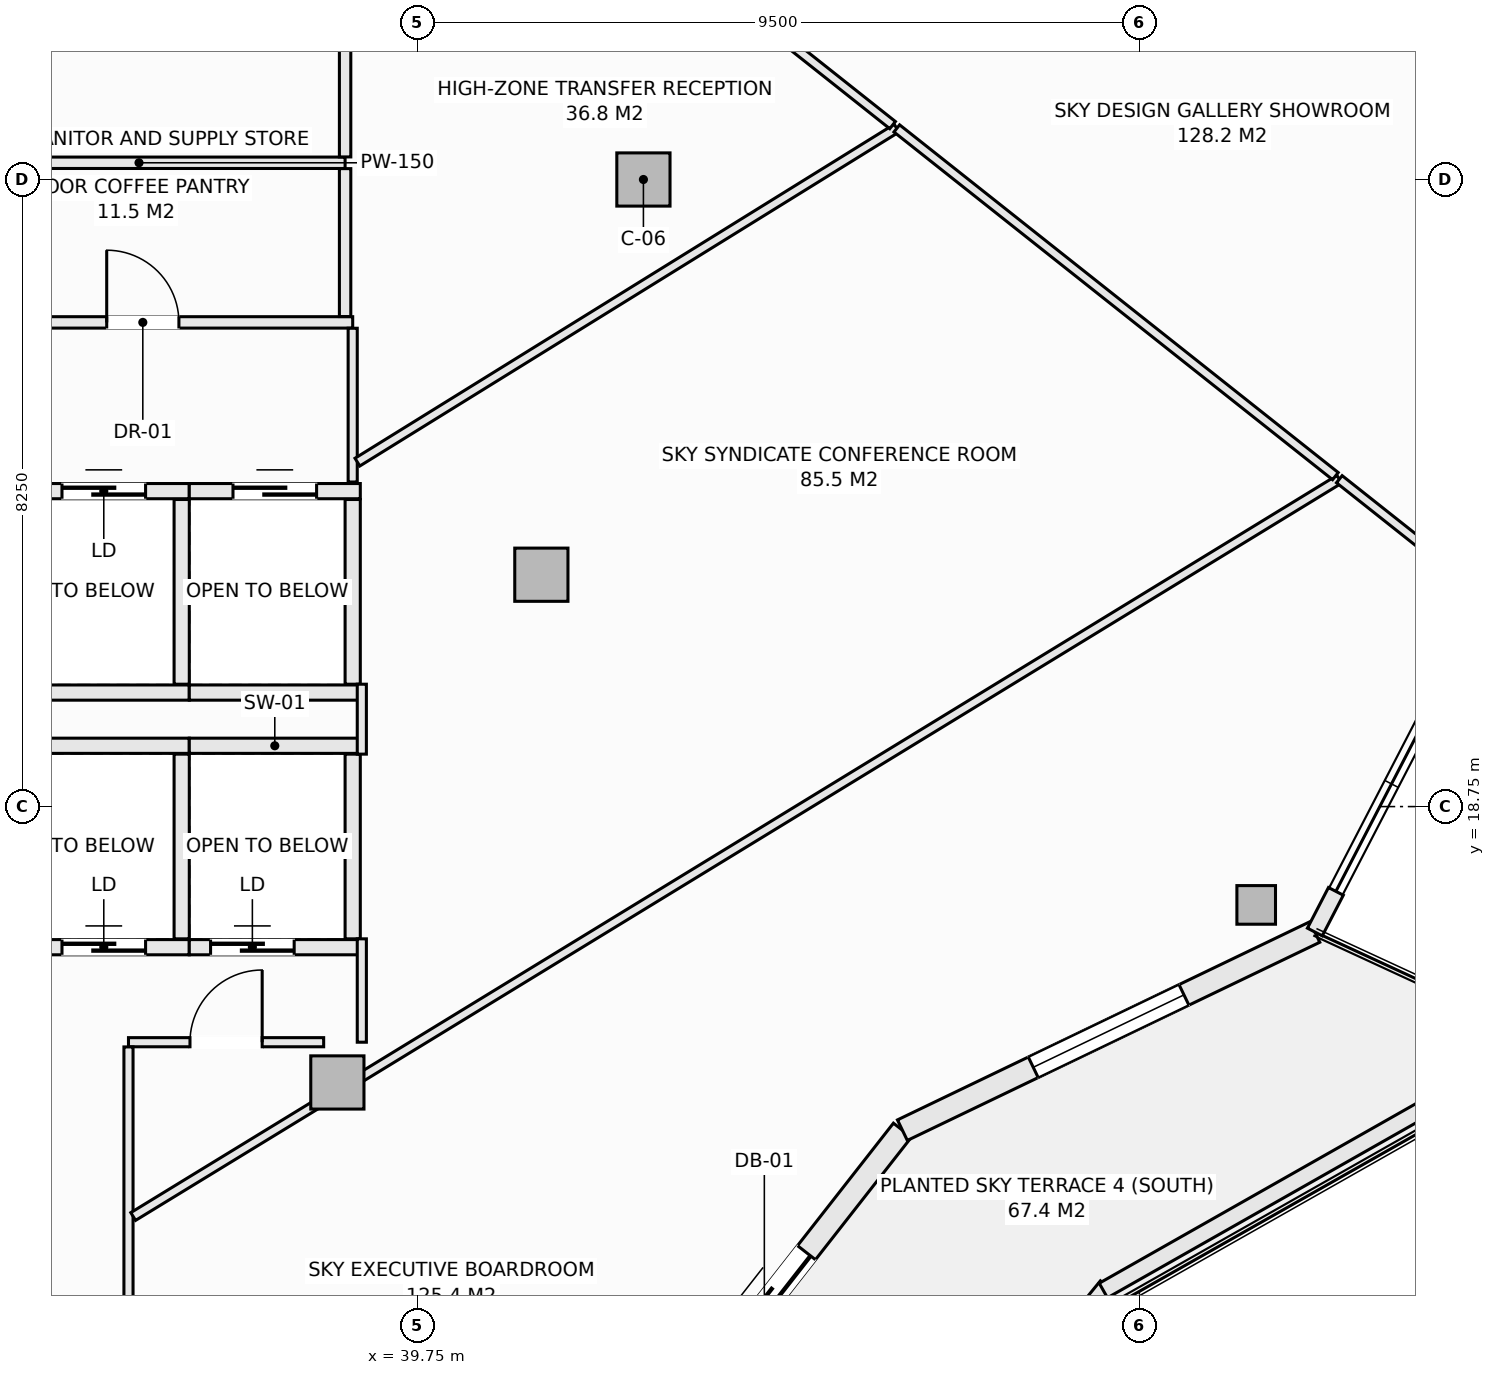
"""IFC4 building model, lengths in metres.
Left out: names, types, materials, properties, quantities, classifications, styles, units other than length and angle.
Written with IfcOpenShell. Run it as: python <this file> out.ifc"""

import sys

from ifc_helpers import new_model, si_unit, direction, frame, frame_2d, origin, origin_2d, place, context, subcontext, project, spatial, rectangle, hollow_rectangle, extrude, element, fill, save


model = new_model("IFC4")
c1 = context("Model", 3, precision=1e-05, world=origin(), true_north=direction((0.0, 1.0)))
c2 = subcontext(c1, "Body", "Model", "MODEL_VIEW")
j1 = project(units=[si_unit("LENGTHUNIT", "METRE"), si_unit("PLANEANGLEUNIT", "RADIAN")], contexts=[c1])
p1 = place(None, origin())
s1 = spatial("IfcSite", under=j1, at=p1, CompositionType="ELEMENT")
p2 = place(p1, origin())
s2 = spatial("IfcBuilding", under=s1, at=p2, CompositionType="ELEMENT")
p3 = place(p2, frame((0.0, 0.0, 191.9)))
s3 = spatial("IfcBuildingStorey", under=s2, at=p3, CompositionType="ELEMENT", Elevation=191.9)
p4 = place(p3, frame((50.787, 17.456, -0.28), z_axis=(0.0, 0.0, 1.0), x_axis=(1.0, 0.0, 0.0)))
e1 = element("IfcColumn", 1, at=p4, inside=s3, PredefinedType="COLUMN", context=c2, shape_type="SweptSolid", body=[
    extrude(hollow_rectangle(XDim=0.508, YDim=0.508, WallThickness=0.019, at=origin_2d()), origin(), (0.0, 0.0, 1.0), 4.51),
])
for number, where, z_axis, x_axis in (
    (2, (42.725, 27.0, -0.28), (0.0, 0.0, 1.0), (1.0, 0.0, 0.0)),
    (3, (38.698, 15.121, -0.28), (0.0, 0.0, 1.0), (1.0, 0.0, 0.0)),
    (4, (41.382, 21.801, -0.28), (0.0, 0.0, 1.0), (1.0, 0.0, 0.0)),
):
    element("IfcColumn", number, at=place(p3, frame(where, z_axis=z_axis, x_axis=x_axis)), inside=s3, PredefinedType="COLUMN", context=c2, shape_type="SweptSolid", body=[
        extrude(rectangle(XDim=0.7, YDim=0.7, at=origin_2d()), origin(), (0.0, 0.0, 1.0), 4.51),
    ])
p5 = place(p3, frame((42.5, 9.853, 0.0), z_axis=(0.0, 0.0, 1.0), x_axis=(0.616450126935, 0.787393955401, 0.0)))
e5 = element("IfcWall", 5, at=p5, inside=s3, PredefinedType="SOLIDWALL", context=c2, shape_type="SweptSolid", body=[
    extrude(rectangle(XDim=5.893, YDim=0.3, at=frame_2d((2.946, 0.0))), origin(), (0.0, 0.0, 1.0), 3.805),
])
p6 = place(p5, frame((2.046, 0.0, 0.0)))
e6 = element("IfcOpeningElement", 6, at=p6, cuts=e5, PredefinedType="OPENING", context=c2, shape_type="SweptSolid", body=[
    extrude(rectangle(XDim=1.8, YDim=2.25, at=frame_2d((0.9, 1.125))), frame((0.0, 0.16, 0.0), z_axis=(0.0, -1.0, 0.0), x_axis=(1.0, 0.0, 0.0)), (0.0, 0.0, 1.0), 0.32),
])
p7 = place(p3, frame((46.133, 14.493, 0.0), z_axis=(0.0, 0.0, 1.0), x_axis=(0.901348331142, 0.433094892545, 0.0)))
e7 = element("IfcWall", 7, at=p7, inside=s3, PredefinedType="SOLIDWALL", context=c2, shape_type="SweptSolid", body=[
    extrude(rectangle(XDim=6.021, YDim=0.3, at=frame_2d((3.01, 0.0))), origin(), (0.0, 0.0, 1.0), 3.805),
])
p8 = place(p7, frame((1.91, 0.0, 0.72)))
e8 = element("IfcOpeningElement", 8, at=p8, cuts=e7, PredefinedType="OPENING", context=c2, shape_type="SweptSolid", body=[
    extrude(rectangle(XDim=2.2, YDim=1.65, at=frame_2d((1.1, 0.825))), frame((0.0, 0.16, 0.0), z_axis=(0.0, -1.0, 0.0), x_axis=(1.0, 0.0, 0.0)), (0.0, 0.0, 1.0), 0.32),
])
p9 = place(p3, frame((51.559, 17.1, 0.0), z_axis=(0.0, 0.0, 1.0), x_axis=(0.459985611197, 0.887926369409, 0.0)))
e9 = element("IfcWall", 9, at=p9, inside=s3, PredefinedType="SOLIDWALL", context=c2, shape_type="SweptSolid", body=[
    extrude(rectangle(XDim=0.602, YDim=0.22, at=frame_2d((0.301, 0.0))), origin(), (0.0, 0.0, 1.0), 3.805),
])
p10 = place(p3, frame((44.448, 7.087, 0.0), z_axis=(0.0, 0.0, 1.0), x_axis=(0.632697312147, 0.774399193699, 0.0)))
e10 = element("IfcWall", 10, at=p10, inside=s3, PredefinedType="PARAPET", context=c2, shape_type="SweptSolid", body=[
    extrude(rectangle(XDim=6.914, YDim=0.22, at=frame_2d((3.457, 0.0))), origin(), (0.0, 0.0, 1.0), 0.52),
])
p11 = place(p3, frame((48.776, 12.383, 0.0), z_axis=(0.0, 0.0, 1.0), x_axis=(0.869860619267, 0.493297580623, 0.0)))
e11 = element("IfcWall", 11, at=p11, inside=s3, PredefinedType="PARAPET", context=c2, shape_type="SweptSolid", body=[
    extrude(rectangle(XDim=6.743, YDim=0.22, at=frame_2d((3.371, 0.0))), origin(), (0.0, 0.0, 1.0), 0.52),
])
p12 = place(p3, frame((34.5, 19.55, 0.0), z_axis=(0.0, 0.0, 1.0), x_axis=(1.0, 0.0, 0.0)))
e12 = element("IfcWall", 12, at=p12, inside=s3, PredefinedType="SOLIDWALL", context=c2, shape_type="SweptSolid", body=[
    extrude(rectangle(XDim=2.25, YDim=0.2, at=frame_2d((1.125, 0.0))), origin(), (0.0, 0.0, 1.0), 4.23),
])
p13 = place(p3, frame((34.5, 16.9, 0.0), z_axis=(0.0, 0.0, 1.0), x_axis=(1.0, 0.0, 0.0)))
e13 = element("IfcWall", 13, at=p13, inside=s3, PredefinedType="SOLIDWALL", context=c2, shape_type="SweptSolid", body=[
    extrude(rectangle(XDim=2.25, YDim=0.2, at=frame_2d((1.125, 0.0))), origin(), (0.0, 0.0, 1.0), 4.23),
])
p14 = place(p13, frame((0.575, 0.0, 0.0)))
e14 = element("IfcOpeningElement", 14, at=p14, cuts=e13, PredefinedType="OPENING", context=c2, shape_type="SweptSolid", body=[
    extrude(rectangle(XDim=1.1, YDim=2.2, at=frame_2d((0.55, 1.1))), frame((0.0, 0.11, 0.0), z_axis=(0.0, -1.0, 0.0), x_axis=(1.0, 0.0, 0.0)), (0.0, 0.0, 1.0), 0.22),
])
p15 = place(p3, frame((36.65, 17.01, 0.0), z_axis=(0.0, 0.0, 1.0), x_axis=(0.0, 1.0, 0.0)))
e15 = element("IfcWall", 15, at=p15, inside=s3, PredefinedType="SOLIDWALL", context=c2, shape_type="SweptSolid", body=[
    extrude(rectangle(XDim=2.43, YDim=0.2, at=frame_2d((1.215, 0.0))), origin(), (0.0, 0.0, 1.0), 4.23),
])
p16 = place(p3, frame((36.75, 19.55, 0.0), z_axis=(0.0, 0.0, 1.0), x_axis=(1.0, 0.0, 0.0)))
e16 = element("IfcWall", 16, at=p16, inside=s3, PredefinedType="SOLIDWALL", context=c2, shape_type="SweptSolid", body=[
    extrude(rectangle(XDim=2.25, YDim=0.2, at=frame_2d((1.125, 0.0))), origin(), (0.0, 0.0, 1.0), 4.23),
])
p17 = place(p3, frame((36.75, 16.9, 0.0), z_axis=(0.0, 0.0, 1.0), x_axis=(1.0, 0.0, 0.0)))
e17 = element("IfcWall", 17, at=p17, inside=s3, PredefinedType="SOLIDWALL", context=c2, shape_type="SweptSolid", body=[
    extrude(rectangle(XDim=2.25, YDim=0.2, at=frame_2d((1.125, 0.0))), origin(), (0.0, 0.0, 1.0), 4.23),
])
p18 = place(p17, frame((0.28, 0.0, 0.0)))
e18 = element("IfcOpeningElement", 18, at=p18, cuts=e17, PredefinedType="OPENING", context=c2, shape_type="SweptSolid", body=[
    extrude(rectangle(XDim=1.1, YDim=2.2, at=frame_2d((0.55, 1.1))), frame((0.0, 0.11, 0.0), z_axis=(0.0, -1.0, 0.0), x_axis=(1.0, 0.0, 0.0)), (0.0, 0.0, 1.0), 0.22),
])
p19 = place(p3, frame((38.9, 17.01, 0.0), z_axis=(0.0, 0.0, 1.0), x_axis=(0.0, 1.0, 0.0)))
e19 = element("IfcWall", 19, at=p19, inside=s3, PredefinedType="SOLIDWALL", context=c2, shape_type="SweptSolid", body=[
    extrude(rectangle(XDim=2.43, YDim=0.2, at=frame_2d((1.215, 0.0))), origin(), (0.0, 0.0, 1.0), 4.23),
])
p20 = place(p3, frame((34.5, 22.9, 0.0), z_axis=(0.0, 0.0, 1.0), x_axis=(1.0, 0.0, 0.0)))
e20 = element("IfcWall", 20, at=p20, inside=s3, PredefinedType="SOLIDWALL", context=c2, shape_type="SweptSolid", body=[
    extrude(rectangle(XDim=2.25, YDim=0.2, at=frame_2d((1.125, 0.0))), origin(), (0.0, 0.0, 1.0), 4.23),
])
p21 = place(p20, frame((0.575, 0.0, 0.0)))
e21 = element("IfcOpeningElement", 21, at=p21, cuts=e20, PredefinedType="OPENING", context=c2, shape_type="SweptSolid", body=[
    extrude(rectangle(XDim=1.1, YDim=2.2, at=frame_2d((0.55, 1.1))), frame((0.0, 0.11, 0.0), z_axis=(0.0, -1.0, 0.0), x_axis=(1.0, 0.0, 0.0)), (0.0, 0.0, 1.0), 0.22),
])
p22 = place(p3, frame((34.5, 20.25, 0.0), z_axis=(0.0, 0.0, 1.0), x_axis=(1.0, 0.0, 0.0)))
e22 = element("IfcWall", 22, at=p22, inside=s3, PredefinedType="SOLIDWALL", context=c2, shape_type="SweptSolid", body=[
    extrude(rectangle(XDim=2.25, YDim=0.2, at=frame_2d((1.125, 0.0))), origin(), (0.0, 0.0, 1.0), 4.23),
])
p23 = place(p3, frame((36.65, 20.36, 0.0), z_axis=(0.0, 0.0, 1.0), x_axis=(0.0, 1.0, 0.0)))
e23 = element("IfcWall", 23, at=p23, inside=s3, PredefinedType="SOLIDWALL", context=c2, shape_type="SweptSolid", body=[
    extrude(rectangle(XDim=2.43, YDim=0.2, at=frame_2d((1.215, 0.0))), origin(), (0.0, 0.0, 1.0), 4.23),
])
p24 = place(p3, frame((36.75, 22.9, 0.0), z_axis=(0.0, 0.0, 1.0), x_axis=(1.0, 0.0, 0.0)))
e24 = element("IfcWall", 24, at=p24, inside=s3, PredefinedType="SOLIDWALL", context=c2, shape_type="SweptSolid", body=[
    extrude(rectangle(XDim=2.25, YDim=0.2, at=frame_2d((1.125, 0.0))), origin(), (0.0, 0.0, 1.0), 4.23),
])
p25 = place(p24, frame((0.575, 0.0, 0.0)))
e25 = element("IfcOpeningElement", 25, at=p25, cuts=e24, PredefinedType="OPENING", context=c2, shape_type="SweptSolid", body=[
    extrude(rectangle(XDim=1.1, YDim=2.2, at=frame_2d((0.55, 1.1))), frame((0.0, 0.11, 0.0), z_axis=(0.0, -1.0, 0.0), x_axis=(1.0, 0.0, 0.0)), (0.0, 0.0, 1.0), 0.22),
])
p26 = place(p3, frame((36.75, 20.25, 0.0), z_axis=(0.0, 0.0, 1.0), x_axis=(1.0, 0.0, 0.0)))
e26 = element("IfcWall", 26, at=p26, inside=s3, PredefinedType="SOLIDWALL", context=c2, shape_type="SweptSolid", body=[
    extrude(rectangle(XDim=2.25, YDim=0.2, at=frame_2d((1.125, 0.0))), origin(), (0.0, 0.0, 1.0), 4.23),
])
p27 = place(p3, frame((38.9, 20.36, 0.0), z_axis=(0.0, 0.0, 1.0), x_axis=(0.0, 1.0, 0.0)))
e27 = element("IfcWall", 27, at=p27, inside=s3, PredefinedType="SOLIDWALL", context=c2, shape_type="SweptSolid", body=[
    extrude(rectangle(XDim=2.43, YDim=0.2, at=frame_2d((1.215, 0.0))), origin(), (0.0, 0.0, 1.0), 4.23),
])
p28 = place(p3, frame((33.377, 25.12, 0.0), z_axis=(0.0, 0.0, 1.0), x_axis=(1.0, 0.0, 0.0)))
e28 = element("IfcWall", 28, at=p28, inside=s3, PredefinedType="PARTITIONING", context=c2, shape_type="SweptSolid", body=[
    extrude(rectangle(XDim=5.523, YDim=0.15, at=frame_2d((2.761, 0.0))), origin(), (0.0, 0.0, 1.0), 4.23),
])
p29 = place(p28, frame((2.287, 0.0, 0.0)))
e29 = element("IfcOpeningElement", 29, at=p29, cuts=e28, PredefinedType="OPENING", context=c2, shape_type="SweptSolid", body=[
    extrude(rectangle(XDim=0.95, YDim=2.1, at=frame_2d((0.475, 1.05))), frame((0.0, 0.085, 0.0), z_axis=(0.0, -1.0, 0.0), x_axis=(1.0, 0.0, 0.0)), (0.0, 0.0, 1.0), 0.17),
])
p30 = place(p3, frame((33.377, 27.22, 0.0), z_axis=(0.0, 0.0, 1.0), x_axis=(1.0, 0.0, 0.0)))
e30 = element("IfcWall", 30, at=p30, inside=s3, PredefinedType="PARTITIONING", context=c2, shape_type="SweptSolid", body=[
    extrude(rectangle(XDim=5.423, YDim=0.15, at=frame_2d((2.711, 0.0))), origin(), (0.0, 0.0, 1.0), 4.23),
])
p31 = place(p3, frame((38.8, 25.197, 0.0), z_axis=(0.0, 0.0, 1.0), x_axis=(0.0, 1.0, 0.0)))
e31 = element("IfcWall", 31, at=p31, inside=s3, PredefinedType="PARTITIONING", context=c2, shape_type="SweptSolid", body=[
    extrude(rectangle(XDim=1.946, YDim=0.15, at=frame_2d((0.973, 0.0))), origin(), (0.0, 0.0, 1.0), 4.23),
])
p32 = place(p3, frame((38.8, 27.297, 0.0), z_axis=(0.0, 0.0, 1.0), x_axis=(0.0, 1.0, 0.0)))
e32 = element("IfcWall", 32, at=p32, inside=s3, PredefinedType="PARTITIONING", context=c2, shape_type="SweptSolid", body=[
    extrude(rectangle(XDim=1.546, YDim=0.15, at=frame_2d((0.773, 0.0))), origin(), (0.0, 0.0, 1.0), 4.23),
])
p33 = place(p3, frame((39.02, 15.65, 0.0), z_axis=(0.0, 0.0, 1.0), x_axis=(0.0, 1.0, 0.0)))
e33 = element("IfcWall", 33, at=p33, inside=s3, PredefinedType="PARTITIONING", context=c2, shape_type="SweptSolid", body=[
    extrude(rectangle(XDim=1.36, YDim=0.12, at=frame_2d((0.68, 0.0))), origin(), (0.0, 0.0, 1.0), 3.678),
])
p34 = place(p3, frame((39.02, 19.44, 0.0), z_axis=(0.0, 0.0, 1.0), x_axis=(0.0, 1.0, 0.0)))
e34 = element("IfcWall", 34, at=p34, inside=s3, PredefinedType="PARTITIONING", context=c2, shape_type="SweptSolid", body=[
    extrude(rectangle(XDim=0.92, YDim=0.12, at=frame_2d((0.46, 0.0))), origin(), (0.0, 0.0, 1.0), 4.23),
])
p35 = place(p3, frame((35.95, 15.65, 0.0), z_axis=(0.0, 0.0, 1.0), x_axis=(1.0, 0.0, 0.0)))
e35 = element("IfcWall", 35, at=p35, inside=s3, PredefinedType="PARTITIONING", context=c2, shape_type="SweptSolid", body=[
    extrude(rectangle(XDim=2.568, YDim=0.12, at=frame_2d((1.284, 0.0))), origin(), (0.0, 0.0, 1.0), 4.23),
])
p36 = place(p35, frame((0.809, 0.0, 0.0)))
e36 = element("IfcOpeningElement", 36, at=p36, cuts=e35, PredefinedType="OPENING", context=c2, shape_type="SweptSolid", body=[
    extrude(rectangle(XDim=0.95, YDim=2.1, at=frame_2d((0.475, 1.05))), frame((0.0, 0.07, 0.0), z_axis=(0.0, -1.0, 0.0), x_axis=(1.0, 0.0, 0.0)), (0.0, 0.0, 1.0), 0.14),
])
p37 = place(p3, frame((35.95, 11.75, 0.0), z_axis=(0.0, 0.0, 1.0), x_axis=(0.0, 1.0, 0.0)))
e37 = element("IfcWall", 37, at=p37, inside=s3, PredefinedType="PARTITIONING", context=c2, shape_type="SweptSolid", body=[
    extrude(rectangle(XDim=3.838, YDim=0.12, at=frame_2d((1.919, 0.0))), origin(), (0.0, 0.0, 1.0), 4.23),
])
p38 = place(p3, frame((38.9, 23.02, 0.0), z_axis=(0.0, 0.0, 1.0), x_axis=(0.0, 1.0, 0.0)))
e38 = element("IfcWall", 38, at=p38, inside=s3, PredefinedType="PARTITIONING", context=c2, shape_type="SweptSolid", body=[
    extrude(rectangle(XDim=2.023, YDim=0.12, at=frame_2d((1.011, 0.0))), origin(), (0.0, 0.0, 1.0), 4.23),
])
p39 = place(p3, frame((38.962, 23.281, 0.0), z_axis=(0.0, 0.0, 1.0), x_axis=(0.850146039188, 0.526546970415, 0.0)))
e39 = element("IfcWall", 39, at=p39, inside=s3, PredefinedType="PARTITIONING", context=c2, shape_type="SweptSolid", body=[
    extrude(rectangle(XDim=8.345, YDim=0.12, at=frame_2d((4.172, 0.0))), origin(), (0.0, 0.0, 1.0), 3.678),
])
p40 = place(p3, frame((36.012, 13.357, 0.0), z_axis=(0.0, 0.0, 1.0), x_axis=(0.853236403134, 0.521524343024, 0.0)))
e40 = element("IfcWall", 40, at=p40, inside=s3, PredefinedType="PARTITIONING", context=c2, shape_type="SweptSolid", body=[
    extrude(rectangle(XDim=18.599, YDim=0.12, at=frame_2d((9.299, 0.0))), origin(), (0.0, 0.0, 1.0), 3.678),
])
p41 = place(p3, frame((38.862, 33.376, 0.0), z_axis=(0.0, 0.0, 1.0), x_axis=(0.78368115762, -0.621163298329, 0.0)))
e41 = element("IfcWall", 41, at=p41, inside=s3, PredefinedType="PARTITIONING", context=c2, shape_type="SweptSolid", body=[
    extrude(rectangle(XDim=9.113, YDim=0.12, at=frame_2d((4.556, 0.0))), origin(), (0.0, 0.0, 1.0), 4.23),
])
p42 = place(p3, frame((46.059, 27.672, 0.0), z_axis=(0.0, 0.0, 1.0), x_axis=(0.783665181, -0.621183454455, 0.0)))
e42 = element("IfcWall", 42, at=p42, inside=s3, PredefinedType="PARTITIONING", context=c2, shape_type="SweptSolid", body=[
    extrude(rectangle(XDim=7.364, YDim=0.12, at=frame_2d((3.682, 0.0))), origin(), (0.0, 0.0, 1.0), 3.678),
])
p43 = place(p3, frame((51.881, 23.057, 0.0), z_axis=(0.0, 0.0, 1.0), x_axis=(0.783717801237, -0.62111706467, 0.0)))
e43 = element("IfcWall", 43, at=p43, inside=s3, PredefinedType="PARTITIONING", context=c2, shape_type="SweptSolid", body=[
    extrude(rectangle(XDim=2.476, YDim=0.12, at=frame_2d((1.238, 0.0))), origin(), (0.0, 0.0, 1.0), 4.23),
])
p44 = place(p6, frame((1.8, 0.0, 0.0), z_axis=(0.0, 0.0, 1.0), x_axis=(-1.0, 0.0, 0.0)))
e44 = element("IfcDoor", 44, at=p44, inside=s3, OperationType="SLIDING_TO_LEFT", PredefinedType="DOOR", context=c2, shape_type="SweptSolid", body=[
    extrude(rectangle(XDim=1.8, YDim=2.25, at=frame_2d((0.9, 1.125))), frame((0.0, 0.025, 0.0), z_axis=(0.0, -1.0, 0.0), x_axis=(1.0, 0.0, 0.0)), (0.0, 0.0, 1.0), 0.05),
])
fill(e6, e44)
p45 = place(p8, origin())
e45 = element("IfcWindow", 45, at=p45, inside=s3, PartitioningType="SINGLE_PANEL", PredefinedType="WINDOW", context=c2, shape_type="SweptSolid", body=[
    extrude(rectangle(XDim=2.2, YDim=1.65, at=frame_2d((1.1, 0.825))), frame((0.0, 0.03, 0.0), z_axis=(0.0, -1.0, 0.0), x_axis=(1.0, 0.0, 0.0)), (0.0, 0.0, 1.0), 0.06),
])
fill(e8, e45)
p46 = place(p14, origin())
e46 = element("IfcDoor", 46, at=p46, inside=s3, OperationType="SLIDING_TO_LEFT", PredefinedType="DOOR", context=c2, shape_type="SweptSolid", body=[
    extrude(rectangle(XDim=1.1, YDim=2.2, at=frame_2d((0.55, 1.1))), frame((0.0, 0.025, 0.0), z_axis=(0.0, -1.0, 0.0), x_axis=(1.0, 0.0, 0.0)), (0.0, 0.0, 1.0), 0.05),
])
fill(e14, e46)
p47 = place(p18, origin())
e47 = element("IfcDoor", 47, at=p47, inside=s3, OperationType="SLIDING_TO_LEFT", PredefinedType="DOOR", context=c2, shape_type="SweptSolid", body=[
    extrude(rectangle(XDim=1.1, YDim=2.2, at=frame_2d((0.55, 1.1))), frame((0.0, 0.025, 0.0), z_axis=(0.0, -1.0, 0.0), x_axis=(1.0, 0.0, 0.0)), (0.0, 0.0, 1.0), 0.05),
])
fill(e18, e47)
p48 = place(p21, origin())
e48 = element("IfcDoor", 48, at=p48, inside=s3, OperationType="SLIDING_TO_LEFT", PredefinedType="DOOR", context=c2, shape_type="SweptSolid", body=[
    extrude(rectangle(XDim=1.1, YDim=2.2, at=frame_2d((0.55, 1.1))), frame((0.0, 0.025, 0.0), z_axis=(0.0, -1.0, 0.0), x_axis=(1.0, 0.0, 0.0)), (0.0, 0.0, 1.0), 0.05),
])
fill(e21, e48)
p49 = place(p25, origin())
e49 = element("IfcDoor", 49, at=p49, inside=s3, OperationType="SLIDING_TO_LEFT", PredefinedType="DOOR", context=c2, shape_type="SweptSolid", body=[
    extrude(rectangle(XDim=1.1, YDim=2.2, at=frame_2d((0.55, 1.1))), frame((0.0, 0.025, 0.0), z_axis=(0.0, -1.0, 0.0), x_axis=(1.0, 0.0, 0.0)), (0.0, 0.0, 1.0), 0.05),
])
fill(e25, e49)
p50 = place(p29, origin())
e50 = element("IfcDoor", 50, at=p50, inside=s3, OperationType="SINGLE_SWING_LEFT", PredefinedType="DOOR", context=c2, shape_type="SweptSolid", body=[
    extrude(rectangle(XDim=0.95, YDim=2.1, at=frame_2d((0.475, 1.05))), frame((0.0, 0.025, 0.0), z_axis=(0.0, -1.0, 0.0), x_axis=(1.0, 0.0, 0.0)), (0.0, 0.0, 1.0), 0.05),
])
fill(e29, e50)
p51 = place(p36, origin())
e51 = element("IfcDoor", 51, at=p51, inside=s3, OperationType="SINGLE_SWING_RIGHT", PredefinedType="DOOR", context=c2, shape_type="SweptSolid", body=[
    extrude(rectangle(XDim=0.95, YDim=2.1, at=frame_2d((0.475, 1.05))), frame((0.0, 0.025, 0.0), z_axis=(0.0, -1.0, 0.0), x_axis=(1.0, 0.0, 0.0)), (0.0, 0.0, 1.0), 0.05),
])
fill(e36, e51)
save(model, sys.argv[1])
